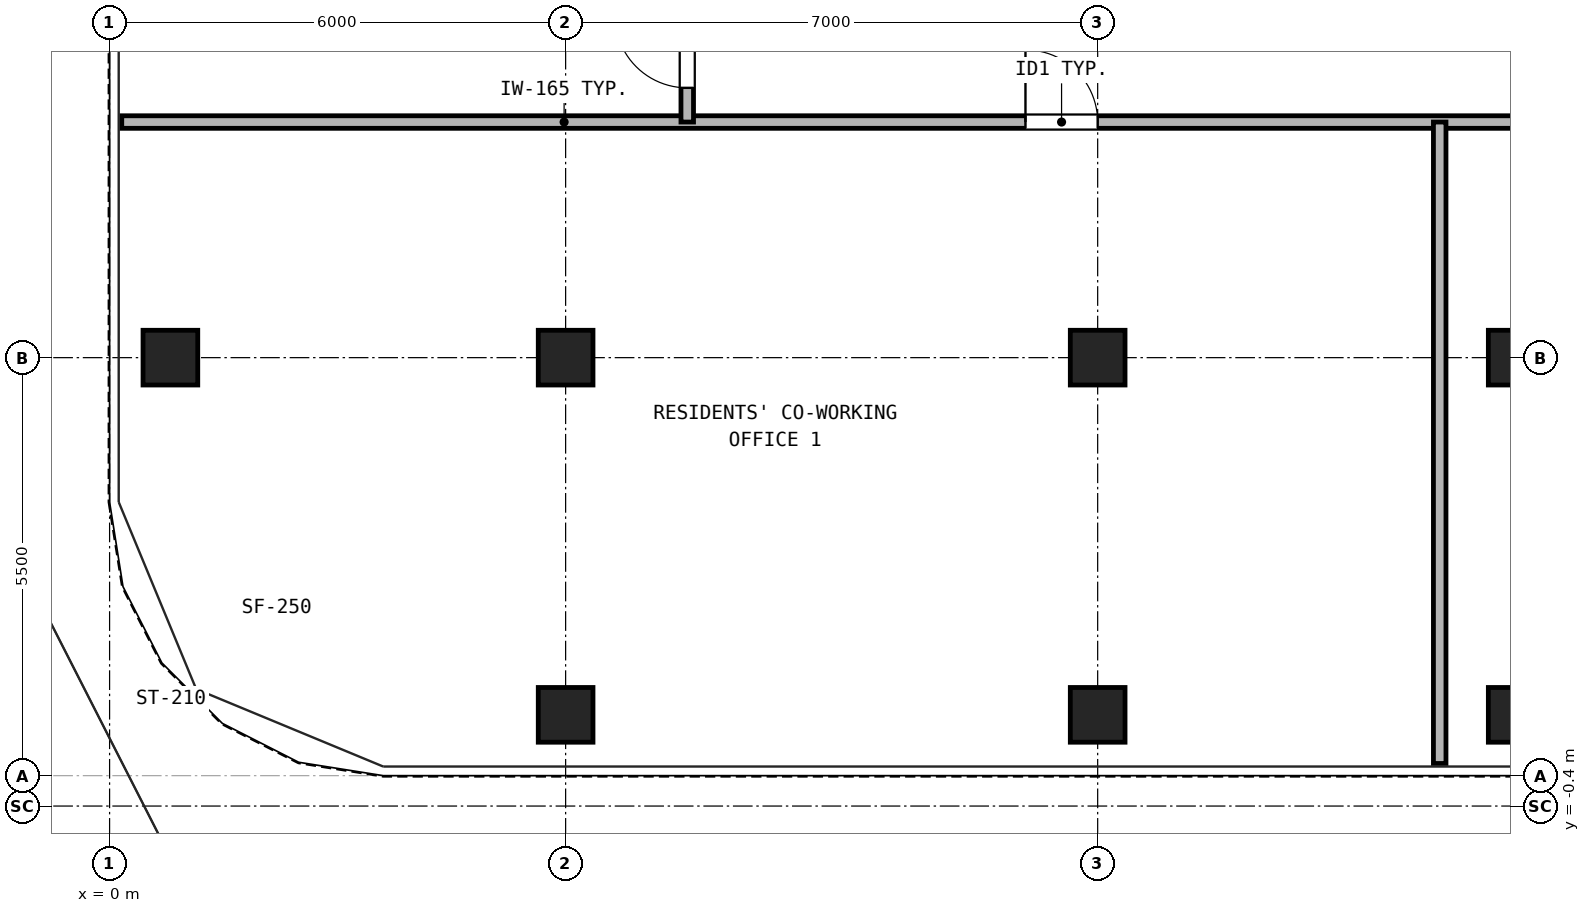
"""IFC4 building model, lengths in metres.
Left out: names, types, materials, properties, quantities, classifications, styles, units other than length and angle.
Written with IfcOpenShell. Run it as: python <this file> out.ifc"""

import sys

from ifc_helpers import new_model, si_unit, direction, frame, frame_2d, origin, origin_2d, place, context, subcontext, project, spatial, rectangle, hollow_rectangle, extrude, source, transform, mapped, element, fill, save


model = new_model("IFC4")
c1 = context("Model", 3, precision=1e-05, world=origin(), true_north=direction((0.0, 1.0)))
c2 = subcontext(c1, "Body", "Model", "MODEL_VIEW")
j1 = project(units=[si_unit("LENGTHUNIT", "METRE"), si_unit("PLANEANGLEUNIT", "RADIAN")], contexts=[c1])
p1 = place(None, origin())
s1 = spatial("IfcSite", under=j1, at=p1, CompositionType="ELEMENT")
p2 = place(p1, origin())
s2 = spatial("IfcBuilding", under=s1, at=p2, CompositionType="ELEMENT")
p3 = place(p2, frame((0.0, 0.0, 193.2)))
s3 = spatial("IfcBuildingStorey", under=s2, at=p3, CompositionType="ELEMENT", Elevation=193.2)
m1 = source(origin(), c2, "Body", "SweptSolid", [
    extrude(hollow_rectangle(XDim=0.72, YDim=0.72, WallThickness=0.04, at=origin_2d()), origin(), (0.0, 0.0, 1.0), 2.95),
])
for number, where, z_axis, x_axis in (
    (1, (6.0, 0.8, 0.0), (0.0, 0.0, 1.0), (1.0, 0.0, 0.0)),
    (2, (13.0, 0.8, 0.0), (0.0, 0.0, 1.0), (1.0, 0.0, 0.0)),
    (3, (18.5, 0.8, 0.0), (0.0, 0.0, 1.0), (1.0, 0.0, 0.0)),
    (4, (0.8, 5.5, 0.0), (0.0, 0.0, 1.0), (1.0, 0.0, 0.0)),
    (5, (6.0, 5.5, 0.0), (0.0, 0.0, 1.0), (1.0, 0.0, 0.0)),
    (6, (13.0, 5.5, 0.0), (0.0, 0.0, 1.0), (1.0, 0.0, 0.0)),
    (7, (18.5, 5.5, 0.0), (0.0, 0.0, 1.0), (1.0, 0.0, 0.0)),
):
    element("IfcColumn", number, at=place(p3, frame(where, z_axis=z_axis, x_axis=x_axis)), inside=s3, PredefinedType="COLUMN", context=c2, shape_type="MappedRepresentation", body=[
        mapped(m1, transform((0.0, 0.0, 0.0), x_axis=(1.0, 0.0, 0.0), y_axis=(0.0, 1.0, 0.0), z_axis=(0.0, 0.0, 1.0), scale=1.0)),
    ])
p4 = place(p3, frame((0.16, 8.6, 0.0), z_axis=(0.0, 0.0, 1.0), x_axis=(1.0, 0.0, 0.0)))
e8 = element("IfcWall", 8, at=p4, inside=s3, PredefinedType="PARTITIONING", context=c2, shape_type="SweptSolid", body=[
    extrude(rectangle(XDim=41.48, YDim=0.165, at=frame_2d((20.74, 0.0))), origin(), (0.0, 0.0, 1.0), 2.583),
])
p5 = place(p4, frame((11.89, 0.0, 0.0)))
e9 = element("IfcOpeningElement", 9, at=p5, cuts=e8, PredefinedType="OPENING", context=c2, shape_type="SweptSolid", body=[
    extrude(rectangle(XDim=0.95, YDim=2.15, at=frame_2d((0.475, 1.075))), frame((0.0, 0.093, 0.0), z_axis=(0.0, -1.0, 0.0), x_axis=(1.0, 0.0, 0.0)), (0.0, 0.0, 1.0), 0.185),
])
p6 = place(p4, frame((20.59, 0.0, 0.0)))
e10 = element("IfcOpeningElement", 10, at=p6, cuts=e8, PredefinedType="OPENING", context=c2, shape_type="SweptSolid", body=[
    extrude(rectangle(XDim=0.95, YDim=2.15, at=frame_2d((0.475, 1.075))), frame((0.0, 0.093, 0.0), z_axis=(0.0, -1.0, 0.0), x_axis=(1.0, 0.0, 0.0)), (0.0, 0.0, 1.0), 0.185),
])
p7 = place(p4, frame((27.59, 0.0, 0.0)))
e11 = element("IfcOpeningElement", 11, at=p7, cuts=e8, PredefinedType="OPENING", context=c2, shape_type="SweptSolid", body=[
    extrude(rectangle(XDim=0.95, YDim=2.15, at=frame_2d((0.475, 1.075))), frame((0.0, 0.093, 0.0), z_axis=(0.0, -1.0, 0.0), x_axis=(1.0, 0.0, 0.0)), (0.0, 0.0, 1.0), 0.185),
])
p8 = place(p4, frame((34.19, 0.0, 0.0)))
e12 = element("IfcOpeningElement", 12, at=p8, cuts=e8, PredefinedType="OPENING", context=c2, shape_type="SweptSolid", body=[
    extrude(rectangle(XDim=0.95, YDim=2.15, at=frame_2d((0.475, 1.075))), frame((0.0, 0.093, 0.0), z_axis=(0.0, -1.0, 0.0), x_axis=(1.0, 0.0, 0.0)), (0.0, 0.0, 1.0), 0.185),
])
p9 = place(p3, frame((7.6, 8.6, 0.0), z_axis=(0.0, 0.0, 1.0), x_axis=(0.0, 1.0, 0.0)))
e13 = element("IfcWall", 13, at=p9, inside=s3, PredefinedType="PARTITIONING", context=c2, shape_type="SweptSolid", body=[
    extrude(rectangle(XDim=2.0, YDim=0.165, at=frame_2d((1.0, 0.0))), origin(), (0.0, 0.0, 1.0), 2.95),
])
p10 = place(p9, frame((0.45, 0.0, 0.0)))
e14 = element("IfcOpeningElement", 14, at=p10, cuts=e13, PredefinedType="OPENING", context=c2, shape_type="SweptSolid", body=[
    extrude(rectangle(XDim=0.95, YDim=2.15, at=frame_2d((0.475, 1.075))), frame((0.0, 0.093, 0.0), z_axis=(0.0, -1.0, 0.0), x_axis=(1.0, 0.0, 0.0)), (0.0, 0.0, 1.0), 0.185),
])
p11 = place(p3, frame((17.5, 0.16, 0.0), z_axis=(0.0, 0.0, 1.0), x_axis=(0.0, 1.0, 0.0)))
e15 = element("IfcWall", 15, at=p11, inside=s3, PredefinedType="PARTITIONING", context=c2, shape_type="SweptSolid", body=[
    extrude(rectangle(XDim=8.44, YDim=0.165, at=frame_2d((4.22, 0.0))), origin(), (0.0, 0.0, 1.0), 2.95),
])
p12 = place(p5, frame((0.95, 0.0, 0.0), z_axis=(0.0, 0.0, 1.0), x_axis=(-1.0, 0.0, 0.0)))
e16 = element("IfcDoor", 16, at=p12, inside=s3, OperationType="SINGLE_SWING_LEFT", PredefinedType="DOOR", context=c2, shape_type="SweptSolid", body=[
    extrude(rectangle(XDim=0.95, YDim=2.15, at=frame_2d((0.475, 1.075))), frame((0.0, 0.025, 0.0), z_axis=(0.0, -1.0, 0.0), x_axis=(1.0, 0.0, 0.0)), (0.0, 0.0, 1.0), 0.05),
])
fill(e9, e16)
p13 = place(p10, frame((0.95, 0.0, 0.0), z_axis=(0.0, 0.0, 1.0), x_axis=(-1.0, 0.0, 0.0)))
e17 = element("IfcDoor", 17, at=p13, inside=s3, OperationType="SINGLE_SWING_RIGHT", PredefinedType="DOOR", context=c2, shape_type="SweptSolid", body=[
    extrude(rectangle(XDim=0.95, YDim=2.15, at=frame_2d((0.475, 1.075))), frame((0.0, 0.025, 0.0), z_axis=(0.0, -1.0, 0.0), x_axis=(1.0, 0.0, 0.0)), (0.0, 0.0, 1.0), 0.05),
])
fill(e14, e17)
save(model, sys.argv[1])
